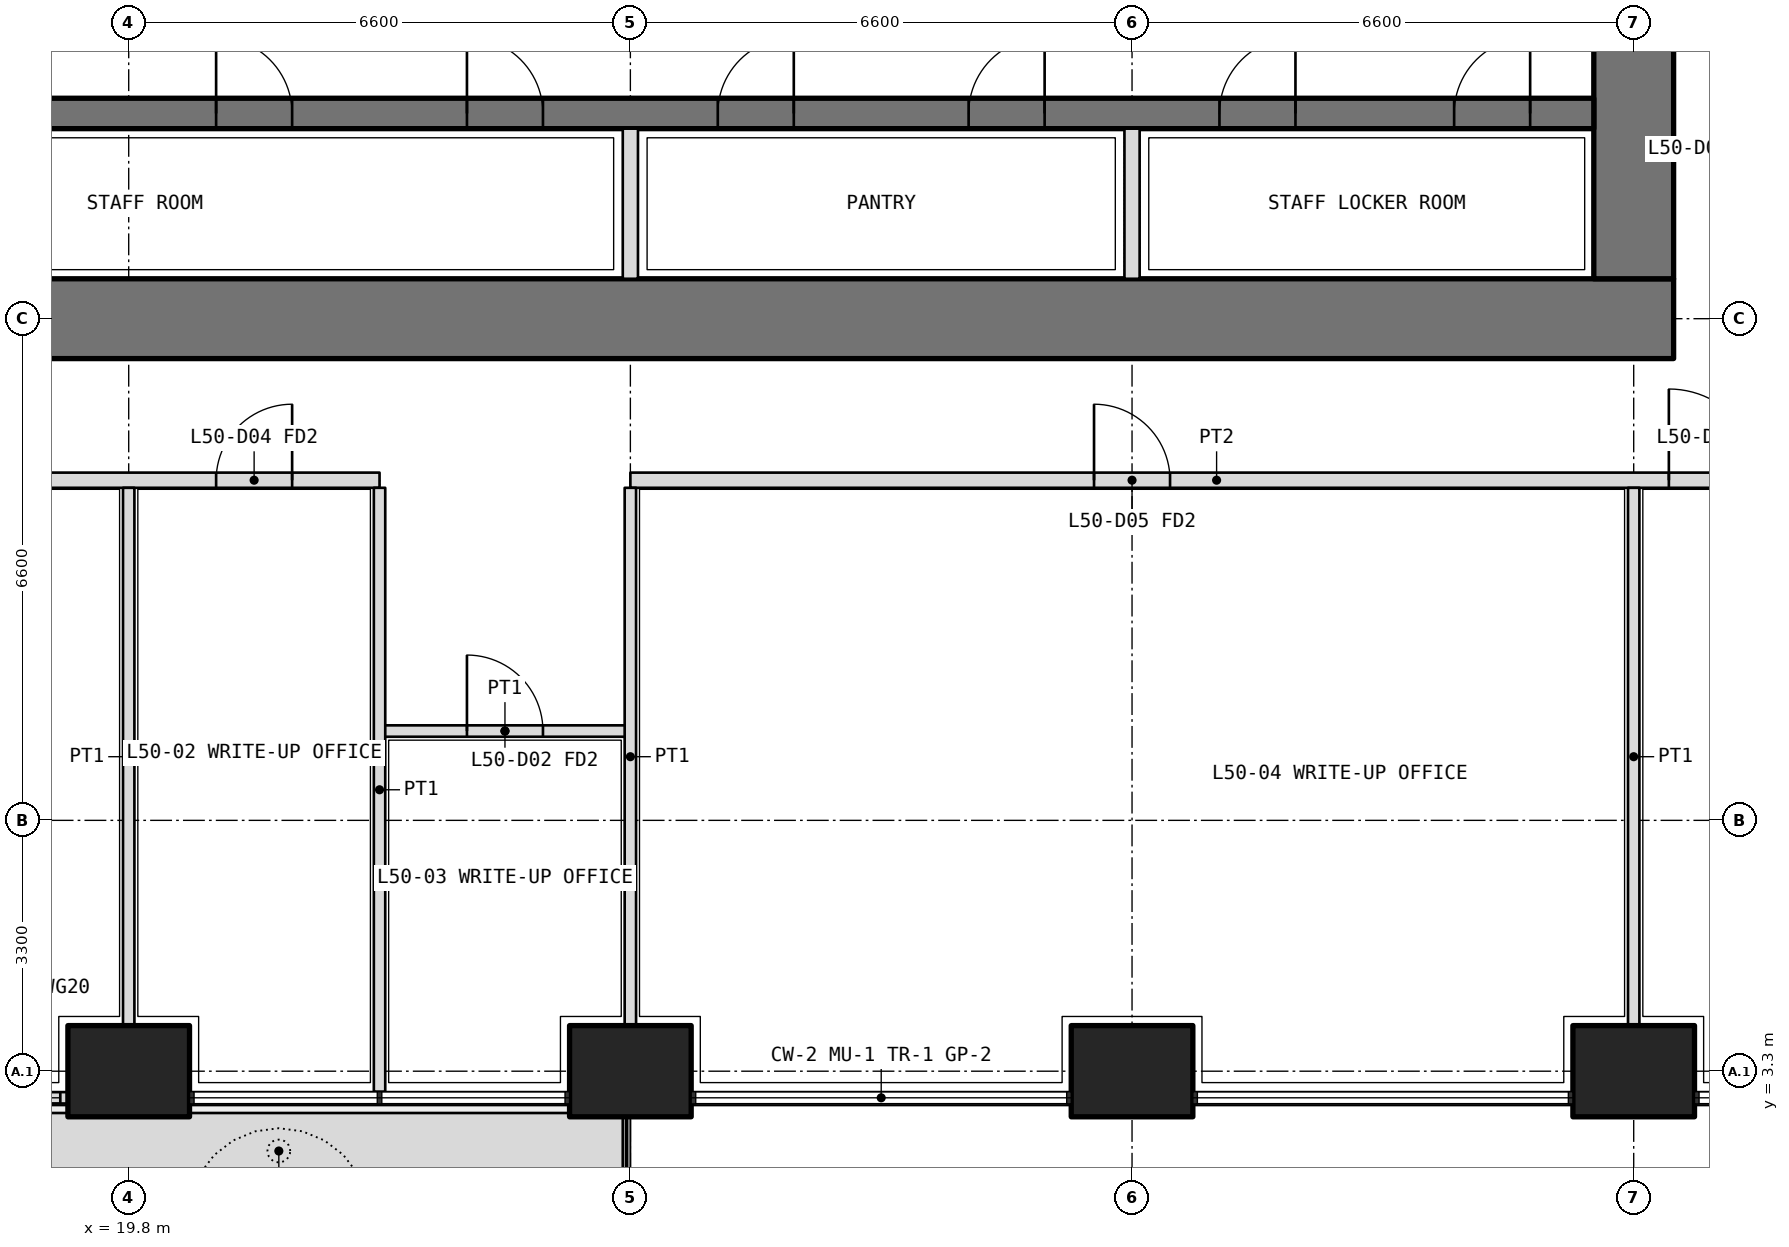
"""IFC4 building model, lengths in metres.
Left out: names, types, materials, properties, quantities, classifications, styles, units other than length and angle.
Written with IfcOpenShell. Run it as: python <this file> out.ifc"""

import sys

from ifc_helpers import new_model, si_unit, direction, frame, frame_2d, origin, origin_2d, place, context, subcontext, project, spatial, polyline, rectangle, outline, extrude, element, fill, save


model = new_model("IFC4")
c1 = context("Model", 3, precision=1e-05, world=origin(), true_north=direction((0.0, 1.0)))
c2 = subcontext(c1, "Body", "Model", "MODEL_VIEW")
j1 = project(units=[si_unit("LENGTHUNIT", "METRE"), si_unit("PLANEANGLEUNIT", "RADIAN")], contexts=[c1])
p1 = place(None, origin())
s1 = spatial("IfcSite", under=j1, at=p1, CompositionType="ELEMENT")
p2 = place(p1, origin())
s2 = spatial("IfcBuilding", under=s1, at=p2, CompositionType="ELEMENT")
p3 = place(p2, frame((0.0, 0.0, 218.7)))
s3 = spatial("IfcBuildingStorey", under=s2, at=p3, CompositionType="ELEMENT", Elevation=218.7)
for number, where, z_axis, x_axis in (
    (1, (19.8, 3.3, 0.0), (0.0, 0.0, 1.0), (1.0, 0.0, 0.0)),
    (2, (26.4, 3.3, 0.0), (0.0, 0.0, 1.0), (1.0, 0.0, 0.0)),
    (3, (33.0, 3.3, 0.0), (0.0, 0.0, 1.0), (1.0, 0.0, 0.0)),
    (4, (39.6, 3.3, 0.0), (0.0, 0.0, 1.0), (1.0, 0.0, 0.0)),
):
    element("IfcColumn", number, at=place(p3, frame(where, z_axis=z_axis, x_axis=x_axis)), inside=s3, PredefinedType="COLUMN", context=c2, shape_type="SweptSolid", body=[
        extrude(rectangle(XDim=1.6, YDim=1.2, at=origin_2d()), origin(), (0.0, 0.0, 1.0), 4.2),
    ])
p4 = place(p3, origin())
e5 = element("IfcWall", 5, at=p4, inside=s3, PredefinedType="USERDEFINED", context=c2, shape_type="SweptSolid", body=[
    extrude(outline(polyline([(17.25, 1.75), (26.3, 1.75), (26.3, 2.75), (17.25, 2.75), (17.25, 1.75)]), holes=[polyline([(17.4, 1.9), (26.15, 1.9), (26.15, 2.6), (17.4, 2.6), (17.4, 1.9)])]), origin(), (0.0, 0.0, 1.0), 1.05),
])
p5 = place(p3, frame((14.0, 2.95, 0.0), z_axis=(0.0, 0.0, 1.0), x_axis=(1.0, 0.0, 0.0)))
e6 = element("IfcWall", 6, at=p5, inside=s3, PredefinedType="SOLIDWALL", context=c2, shape_type="SweptSolid", body=[
    extrude(rectangle(XDim=5.0, YDim=0.15, at=frame_2d((2.5, 0.0))), origin(), (0.0, 0.0, 1.0), 2.05),
])
p6 = place(p5, frame((2.75, 0.0, 0.0)))
e7 = element("IfcOpeningElement", 7, at=p6, cuts=e6, PredefinedType="OPENING", context=c2, shape_type="SweptSolid", body=[
    extrude(rectangle(XDim=1.0, YDim=2.0, at=frame_2d((0.5, 1.0))), frame((0.0, 0.085, 0.0), z_axis=(0.0, -1.0, 0.0), x_axis=(1.0, 0.0, 0.0)), (0.0, 0.0, 1.0), 0.17),
])
p7 = place(p5, frame((0.1, 0.0, 0.1)))
e8 = element("IfcOpeningElement", 8, at=p7, cuts=e6, PredefinedType="OPENING", context=c2, shape_type="SweptSolid", body=[
    extrude(rectangle(XDim=2.15, YDim=1.65, at=frame_2d((1.075, 0.825))), frame((0.0, 0.085, 0.0), z_axis=(0.0, -1.0, 0.0), x_axis=(1.0, 0.0, 0.0)), (0.0, 0.0, 1.0), 0.17),
])
p8 = place(p5, frame((3.85, 0.0, 0.1)))
e9 = element("IfcOpeningElement", 9, at=p8, cuts=e6, PredefinedType="OPENING", context=c2, shape_type="SweptSolid", body=[
    extrude(rectangle(XDim=1.05, YDim=1.65, at=frame_2d((0.525, 0.825))), frame((0.0, 0.085, 0.0), z_axis=(0.0, -1.0, 0.0), x_axis=(1.0, 0.0, 0.0)), (0.0, 0.0, 1.0), 0.17),
])
p9 = place(p3, frame((12.675, 13.2, 0.0), z_axis=(0.0, 0.0, 1.0), x_axis=(1.0, 0.0, 0.0)))
e10 = element("IfcWall", 10, at=p9, inside=s3, PredefinedType="SHEAR", context=c2, shape_type="SweptSolid", body=[
    extrude(rectangle(XDim=27.45, YDim=1.05, at=frame_2d((13.725, 0.0))), origin(), (0.0, 0.0, 1.0), 4.2),
])
p10 = place(p3, frame((39.6, 13.725, 0.0), z_axis=(0.0, 0.0, 1.0), x_axis=(0.0, 1.0, 0.0)))
e11 = element("IfcWall", 11, at=p10, inside=s3, PredefinedType="SHEAR", context=c2, shape_type="SweptSolid", body=[
    extrude(rectangle(XDim=18.75, YDim=1.05, at=frame_2d((9.375, 0.0))), origin(), (0.0, 0.0, 1.0), 4.2),
])
p11 = place(p10, frame((3.025, 0.0, 0.0)))
e12 = element("IfcOpeningElement", 12, at=p11, cuts=e11, PredefinedType="OPENING", context=c2, shape_type="SweptSolid", body=[
    extrude(rectangle(XDim=1.6, YDim=2.1, at=frame_2d((0.8, 1.05))), frame((0.0, 0.535, 0.0), z_axis=(0.0, -1.0, 0.0), x_axis=(1.0, 0.0, 0.0)), (0.0, 0.0, 1.0), 1.07),
])
p12 = place(p10, frame((13.825, 0.0, 0.0)))
e13 = element("IfcOpeningElement", 13, at=p12, cuts=e11, PredefinedType="OPENING", context=c2, shape_type="SweptSolid", body=[
    extrude(rectangle(XDim=1.6, YDim=2.1, at=frame_2d((0.8, 1.05))), frame((0.0, 0.535, 0.0), z_axis=(0.0, -1.0, 0.0), x_axis=(1.0, 0.0, 0.0)), (0.0, 0.0, 1.0), 1.07),
])
p13 = place(p3, frame((13.725, 15.9, 0.0), z_axis=(0.0, 0.0, 1.0), x_axis=(1.0, 0.0, 0.0)))
e14 = element("IfcWall", 14, at=p13, inside=s3, PredefinedType="SHEAR", context=c2, shape_type="SweptSolid", body=[
    extrude(rectangle(XDim=25.35, YDim=0.4, at=frame_2d((12.675, 0.0))), origin(), (0.0, 0.0, 1.0), 4.2),
])
p14 = place(p13, frame((0.837, 0.0, 0.0)))
e15 = element("IfcOpeningElement", 15, at=p14, cuts=e14, PredefinedType="OPENING", context=c2, shape_type="SweptSolid", body=[
    extrude(rectangle(XDim=1.0, YDim=2.1, at=frame_2d((0.5, 1.05))), frame((0.0, 0.21, 0.0), z_axis=(0.0, -1.0, 0.0), x_axis=(1.0, 0.0, 0.0)), (0.0, 0.0, 1.0), 0.42),
])
p15 = place(p13, frame((3.925, 0.0, 0.0)))
e16 = element("IfcOpeningElement", 16, at=p15, cuts=e14, PredefinedType="OPENING", context=c2, shape_type="SweptSolid", body=[
    extrude(rectangle(XDim=1.0, YDim=2.1, at=frame_2d((0.5, 1.05))), frame((0.0, 0.21, 0.0), z_axis=(0.0, -1.0, 0.0), x_axis=(1.0, 0.0, 0.0)), (0.0, 0.0, 1.0), 0.42),
])
p16 = place(p13, frame((7.225, 0.0, 0.0)))
e17 = element("IfcOpeningElement", 17, at=p16, cuts=e14, PredefinedType="OPENING", context=c2, shape_type="SweptSolid", body=[
    extrude(rectangle(XDim=1.0, YDim=2.1, at=frame_2d((0.5, 1.05))), frame((0.0, 0.21, 0.0), z_axis=(0.0, -1.0, 0.0), x_axis=(1.0, 0.0, 0.0)), (0.0, 0.0, 1.0), 0.42),
])
p17 = place(p13, frame((10.525, 0.0, 0.0)))
e18 = element("IfcOpeningElement", 18, at=p17, cuts=e14, PredefinedType="OPENING", context=c2, shape_type="SweptSolid", body=[
    extrude(rectangle(XDim=1.0, YDim=2.1, at=frame_2d((0.5, 1.05))), frame((0.0, 0.21, 0.0), z_axis=(0.0, -1.0, 0.0), x_axis=(1.0, 0.0, 0.0)), (0.0, 0.0, 1.0), 0.42),
])
p18 = place(p13, frame((13.825, 0.0, 0.0)))
e19 = element("IfcOpeningElement", 19, at=p18, cuts=e14, PredefinedType="OPENING", context=c2, shape_type="SweptSolid", body=[
    extrude(rectangle(XDim=1.0, YDim=2.1, at=frame_2d((0.5, 1.05))), frame((0.0, 0.21, 0.0), z_axis=(0.0, -1.0, 0.0), x_axis=(1.0, 0.0, 0.0)), (0.0, 0.0, 1.0), 0.42),
])
p19 = place(p13, frame((17.125, 0.0, 0.0)))
e20 = element("IfcOpeningElement", 20, at=p19, cuts=e14, PredefinedType="OPENING", context=c2, shape_type="SweptSolid", body=[
    extrude(rectangle(XDim=1.0, YDim=2.1, at=frame_2d((0.5, 1.05))), frame((0.0, 0.21, 0.0), z_axis=(0.0, -1.0, 0.0), x_axis=(1.0, 0.0, 0.0)), (0.0, 0.0, 1.0), 0.42),
])
p20 = place(p13, frame((20.425, 0.0, 0.0)))
e21 = element("IfcOpeningElement", 21, at=p20, cuts=e14, PredefinedType="OPENING", context=c2, shape_type="SweptSolid", body=[
    extrude(rectangle(XDim=1.0, YDim=2.1, at=frame_2d((0.5, 1.05))), frame((0.0, 0.21, 0.0), z_axis=(0.0, -1.0, 0.0), x_axis=(1.0, 0.0, 0.0)), (0.0, 0.0, 1.0), 0.42),
])
p21 = place(p13, frame((23.512, 0.0, 0.0)))
e22 = element("IfcOpeningElement", 22, at=p21, cuts=e14, PredefinedType="OPENING", context=c2, shape_type="SweptSolid", body=[
    extrude(rectangle(XDim=1.0, YDim=2.1, at=frame_2d((0.5, 1.05))), frame((0.0, 0.21, 0.0), z_axis=(0.0, -1.0, 0.0), x_axis=(1.0, 0.0, 0.0)), (0.0, 0.0, 1.0), 0.42),
])
for number, where, z_axis, x_axis in (
    (23, (26.4, 13.725, 0.0), (0.0, 0.0, 1.0), (0.0, 1.0, 0.0)),
    (24, (33.0, 13.725, 0.0), (0.0, 0.0, 1.0), (0.0, 1.0, 0.0)),
):
    element("IfcWall", number, at=place(p3, frame(where, z_axis=z_axis, x_axis=x_axis)), inside=s3, PredefinedType="PARTITIONING", context=c2, shape_type="SweptSolid", body=[
        extrude(rectangle(XDim=1.975, YDim=0.2, at=frame_2d((0.987, 0.0))), origin(), (0.0, 0.0, 1.0), 4.2),
    ])
p22 = place(p3, frame((10.975, 11.075, 0.0), z_axis=(0.0, 0.0, 1.0), x_axis=(1.0, 0.0, 0.0)))
e25 = element("IfcWall", 25, at=p22, inside=s3, PredefinedType="PARTITIONING", context=c2, shape_type="SweptSolid", body=[
    extrude(rectangle(XDim=12.125, YDim=0.2, at=frame_2d((6.062, 0.0))), origin(), (0.0, 0.0, 1.0), 2.55),
])
p23 = place(p22, frame((3.962, 0.0, 0.0)))
e26 = element("IfcOpeningElement", 26, at=p23, cuts=e25, PredefinedType="OPENING", context=c2, shape_type="SweptSolid", body=[
    extrude(rectangle(XDim=1.0, YDim=2.1, at=frame_2d((0.5, 1.05))), frame((0.0, 0.11, 0.0), z_axis=(0.0, -1.0, 0.0), x_axis=(1.0, 0.0, 0.0)), (0.0, 0.0, 1.0), 0.22),
])
p24 = place(p22, frame((9.975, 0.0, 0.0)))
e27 = element("IfcOpeningElement", 27, at=p24, cuts=e25, PredefinedType="OPENING", context=c2, shape_type="SweptSolid", body=[
    extrude(rectangle(XDim=1.0, YDim=2.1, at=frame_2d((0.5, 1.05))), frame((0.0, 0.11, 0.0), z_axis=(0.0, -1.0, 0.0), x_axis=(1.0, 0.0, 0.0)), (0.0, 0.0, 1.0), 0.22),
])
p25 = place(p3, frame((26.4, 11.075, 0.0), z_axis=(0.0, 0.0, 1.0), x_axis=(1.0, 0.0, 0.0)))
e28 = element("IfcWall", 28, at=p25, inside=s3, PredefinedType="PARTITIONING", context=c2, shape_type="SweptSolid", body=[
    extrude(rectangle(XDim=15.425, YDim=0.2, at=frame_2d((7.712, 0.0))), origin(), (0.0, 0.0, 1.0), 2.55),
])
p26 = place(p25, frame((6.1, 0.0, 0.0)))
e29 = element("IfcOpeningElement", 29, at=p26, cuts=e28, PredefinedType="OPENING", context=c2, shape_type="SweptSolid", body=[
    extrude(rectangle(XDim=1.0, YDim=2.1, at=frame_2d((0.5, 1.05))), frame((0.0, 0.11, 0.0), z_axis=(0.0, -1.0, 0.0), x_axis=(1.0, 0.0, 0.0)), (0.0, 0.0, 1.0), 0.22),
])
p27 = place(p25, frame((13.663, 0.0, 0.0)))
e30 = element("IfcOpeningElement", 30, at=p27, cuts=e28, PredefinedType="OPENING", context=c2, shape_type="SweptSolid", body=[
    extrude(rectangle(XDim=1.2, YDim=2.1, at=frame_2d((0.6, 1.05))), frame((0.0, 0.11, 0.0), z_axis=(0.0, -1.0, 0.0), x_axis=(1.0, 0.0, 0.0)), (0.0, 0.0, 1.0), 0.22),
])
p28 = place(p3, frame((23.1, 7.775, 0.0), z_axis=(0.0, 0.0, 1.0), x_axis=(1.0, 0.0, 0.0)))
e31 = element("IfcWall", 31, at=p28, inside=s3, PredefinedType="PARTITIONING", context=c2, shape_type="SweptSolid", body=[
    extrude(rectangle(XDim=3.3, YDim=0.15, at=frame_2d((1.65, 0.0))), origin(), (0.0, 0.0, 1.0), 2.55),
])
p29 = place(p28, frame((1.15, 0.0, 0.0)))
e32 = element("IfcOpeningElement", 32, at=p29, cuts=e31, PredefinedType="OPENING", context=c2, shape_type="SweptSolid", body=[
    extrude(rectangle(XDim=1.0, YDim=2.1, at=frame_2d((0.5, 1.05))), frame((0.0, 0.085, 0.0), z_axis=(0.0, -1.0, 0.0), x_axis=(1.0, 0.0, 0.0)), (0.0, 0.0, 1.0), 0.17),
])
p30 = place(p3, frame((19.8, 3.9, 0.0), z_axis=(0.0, 0.0, 1.0), x_axis=(0.0, 1.0, 0.0)))
e33 = element("IfcWall", 33, at=p30, inside=s3, PredefinedType="PARTITIONING", context=c2, shape_type="SweptSolid", body=[
    extrude(rectangle(XDim=7.075, YDim=0.15, at=frame_2d((3.538, 0.0))), origin(), (0.0, 0.0, 1.0), 2.55),
])
p31 = place(p3, frame((23.1, 3.03, 0.0), z_axis=(0.0, 0.0, 1.0), x_axis=(0.0, 1.0, 0.0)))
e34 = element("IfcWall", 34, at=p31, inside=s3, PredefinedType="PARTITIONING", context=c2, shape_type="SweptSolid", body=[
    extrude(rectangle(XDim=7.945, YDim=0.15, at=frame_2d((3.973, 0.0))), origin(), (0.0, 0.0, 1.0), 3.85),
])
for number, where, z_axis, x_axis in (
    (35, (26.4, 3.9, 0.0), (0.0, 0.0, 1.0), (0.0, 1.0, 0.0)),
    (36, (39.6, 3.9, 0.0), (0.0, 0.0, 1.0), (0.0, 1.0, 0.0)),
):
    element("IfcWall", number, at=place(p3, frame(where, z_axis=z_axis, x_axis=x_axis)), inside=s3, PredefinedType="PARTITIONING", context=c2, shape_type="SweptSolid", body=[
        extrude(rectangle(XDim=7.075, YDim=0.15, at=frame_2d((3.538, 0.0))), origin(), (0.0, 0.0, 1.0), 2.55),
    ])
p32 = place(p8, origin())
e37 = element("IfcWindow", 37, at=p32, inside=s3, PartitioningType="SINGLE_PANEL", PredefinedType="WINDOW", context=c2, shape_type="SweptSolid", body=[
    extrude(rectangle(XDim=1.05, YDim=1.65, at=frame_2d((0.525, 0.825))), frame((0.0, 0.03, 0.0), z_axis=(0.0, -1.0, 0.0), x_axis=(1.0, 0.0, 0.0)), (0.0, 0.0, 1.0), 0.06),
])
fill(e9, e37)
p33 = place(p24, origin())
e38 = element("IfcDoor", 38, at=p33, inside=s3, OperationType="SINGLE_SWING_RIGHT", PredefinedType="DOOR", context=c2, shape_type="SweptSolid", body=[
    extrude(rectangle(XDim=1.0, YDim=2.1, at=frame_2d((0.5, 1.05))), frame((0.0, 0.025, 0.0), z_axis=(0.0, -1.0, 0.0), x_axis=(1.0, 0.0, 0.0)), (0.0, 0.0, 1.0), 0.05),
])
fill(e27, e38)
p34 = place(p29, origin())
e39 = element("IfcDoor", 39, at=p34, inside=s3, OperationType="SINGLE_SWING_LEFT", PredefinedType="DOOR", context=c2, shape_type="SweptSolid", body=[
    extrude(rectangle(XDim=1.0, YDim=2.1, at=frame_2d((0.5, 1.05))), frame((0.0, 0.025, 0.0), z_axis=(0.0, -1.0, 0.0), x_axis=(1.0, 0.0, 0.0)), (0.0, 0.0, 1.0), 0.05),
])
fill(e32, e39)
p35 = place(p26, origin())
e40 = element("IfcDoor", 40, at=p35, inside=s3, OperationType="SINGLE_SWING_LEFT", PredefinedType="DOOR", context=c2, shape_type="SweptSolid", body=[
    extrude(rectangle(XDim=1.0, YDim=2.1, at=frame_2d((0.5, 1.05))), frame((0.0, 0.025, 0.0), z_axis=(0.0, -1.0, 0.0), x_axis=(1.0, 0.0, 0.0)), (0.0, 0.0, 1.0), 0.05),
])
fill(e29, e40)
p36 = place(p27, origin())
e41 = element("IfcDoor", 41, at=p36, inside=s3, OperationType="DOUBLE_DOOR_SINGLE_SWING", PredefinedType="DOOR", context=c2, shape_type="SweptSolid", body=[
    extrude(rectangle(XDim=1.2, YDim=2.1, at=frame_2d((0.6, 1.05))), frame((0.0, 0.025, 0.0), z_axis=(0.0, -1.0, 0.0), x_axis=(1.0, 0.0, 0.0)), (0.0, 0.0, 1.0), 0.05),
])
fill(e30, e41)
p37 = place(p16, origin())
e42 = element("IfcDoor", 42, at=p37, inside=s3, OperationType="SINGLE_SWING_LEFT", PredefinedType="DOOR", context=c2, shape_type="SweptSolid", body=[
    extrude(rectangle(XDim=1.0, YDim=2.1, at=frame_2d((0.5, 1.05))), frame((0.0, 0.025, 0.0), z_axis=(0.0, -1.0, 0.0), x_axis=(1.0, 0.0, 0.0)), (0.0, 0.0, 1.0), 0.05),
])
fill(e17, e42)
p38 = place(p17, origin())
e43 = element("IfcDoor", 43, at=p38, inside=s3, OperationType="SINGLE_SWING_LEFT", PredefinedType="DOOR", context=c2, shape_type="SweptSolid", body=[
    extrude(rectangle(XDim=1.0, YDim=2.1, at=frame_2d((0.5, 1.05))), frame((0.0, 0.025, 0.0), z_axis=(0.0, -1.0, 0.0), x_axis=(1.0, 0.0, 0.0)), (0.0, 0.0, 1.0), 0.05),
])
fill(e18, e43)
p39 = place(p18, origin())
e44 = element("IfcDoor", 44, at=p39, inside=s3, OperationType="SINGLE_SWING_RIGHT", PredefinedType="DOOR", context=c2, shape_type="SweptSolid", body=[
    extrude(rectangle(XDim=1.0, YDim=2.1, at=frame_2d((0.5, 1.05))), frame((0.0, 0.025, 0.0), z_axis=(0.0, -1.0, 0.0), x_axis=(1.0, 0.0, 0.0)), (0.0, 0.0, 1.0), 0.05),
])
fill(e19, e44)
p40 = place(p19, origin())
e45 = element("IfcDoor", 45, at=p40, inside=s3, OperationType="SINGLE_SWING_RIGHT", PredefinedType="DOOR", context=c2, shape_type="SweptSolid", body=[
    extrude(rectangle(XDim=1.0, YDim=2.1, at=frame_2d((0.5, 1.05))), frame((0.0, 0.025, 0.0), z_axis=(0.0, -1.0, 0.0), x_axis=(1.0, 0.0, 0.0)), (0.0, 0.0, 1.0), 0.05),
])
fill(e20, e45)
p41 = place(p20, origin())
e46 = element("IfcDoor", 46, at=p41, inside=s3, OperationType="SINGLE_SWING_RIGHT", PredefinedType="DOOR", context=c2, shape_type="SweptSolid", body=[
    extrude(rectangle(XDim=1.0, YDim=2.1, at=frame_2d((0.5, 1.05))), frame((0.0, 0.025, 0.0), z_axis=(0.0, -1.0, 0.0), x_axis=(1.0, 0.0, 0.0)), (0.0, 0.0, 1.0), 0.05),
])
fill(e21, e46)
p42 = place(p21, origin())
e47 = element("IfcDoor", 47, at=p42, inside=s3, OperationType="SINGLE_SWING_RIGHT", PredefinedType="DOOR", context=c2, shape_type="SweptSolid", body=[
    extrude(rectangle(XDim=1.0, YDim=2.1, at=frame_2d((0.5, 1.05))), frame((0.0, 0.025, 0.0), z_axis=(0.0, -1.0, 0.0), x_axis=(1.0, 0.0, 0.0)), (0.0, 0.0, 1.0), 0.05),
])
fill(e22, e47)
save(model, sys.argv[1])
